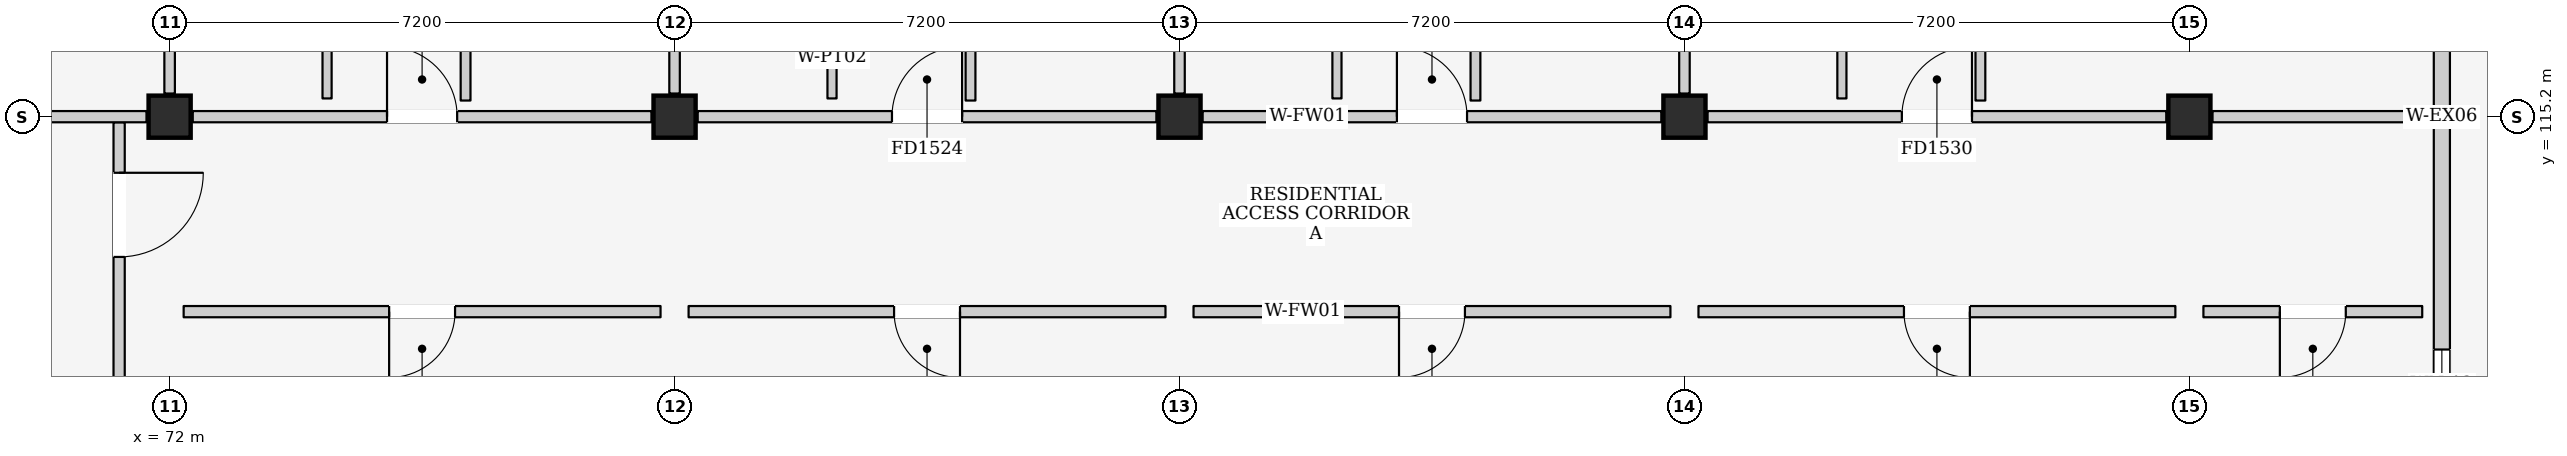
"""IFC4 building model, lengths in metres.
Left out: names, types, materials, properties, quantities, classifications, styles, units other than length and angle.
Written with IfcOpenShell. Run it as: python <this file> out.ifc"""

import sys

from ifc_helpers import new_model, si_unit, direction, frame, frame_2d, origin, origin_2d, place, context, subcontext, project, spatial, rectangle, extrude, element, fill, save


model = new_model("IFC4")
c1 = context("Model", 3, precision=1e-05, world=origin(), true_north=direction((0.0, 1.0)))
c2 = subcontext(c1, "Body", "Model", "MODEL_VIEW")
j1 = project(units=[si_unit("LENGTHUNIT", "METRE"), si_unit("PLANEANGLEUNIT", "RADIAN")], contexts=[c1])
p1 = place(None, origin())
s1 = spatial("IfcSite", under=j1, at=p1, CompositionType="ELEMENT")
p2 = place(p1, origin())
s2 = spatial("IfcBuilding", under=s1, at=p2, CompositionType="ELEMENT")
p3 = place(p2, frame((0.0, 0.0, 25.1)))
s3 = spatial("IfcBuildingStorey", under=s2, at=p3, CompositionType="ELEMENT", Elevation=25.1)
for number, where, z_axis, x_axis in (
    (1, (72.0, 115.2, 0.0), (0.0, 0.0, 1.0), (1.0, 0.0, 0.0)),
    (2, (79.2, 115.2, 0.0), (0.0, 0.0, 1.0), (1.0, 0.0, 0.0)),
    (3, (86.4, 115.2, 0.0), (0.0, 0.0, 1.0), (1.0, 0.0, 0.0)),
    (4, (93.6, 115.2, 0.0), (0.0, 0.0, 1.0), (1.0, 0.0, 0.0)),
    (5, (100.8, 115.2, 0.0), (0.0, 0.0, 1.0), (1.0, 0.0, 0.0)),
):
    element("IfcColumn", number, at=place(p3, frame(where, z_axis=z_axis, x_axis=x_axis)), inside=s3, PredefinedType="COLUMN", context=c2, shape_type="SweptSolid", body=[
        extrude(rectangle(XDim=0.6, YDim=0.6, at=origin_2d()), origin(), (0.0, 0.0, 1.0), 3.2),
    ])
p4 = place(p3, frame((104.4, 108.13, 0.0), z_axis=(0.0, 0.0, 1.0), x_axis=(0.0, 1.0, 0.0)))
e6 = element("IfcWall", 6, at=p4, inside=s3, PredefinedType="ELEMENTEDWALL", context=c2, shape_type="SweptSolid", body=[
    extrude(rectangle(XDim=7.07, YDim=0.23, at=frame_2d((3.535, 0.0))), origin(), (0.0, 0.0, 1.0), 2.425),
])
p5 = place(p4, frame((2.75, 0.0, 1.1)))
e7 = element("IfcOpeningElement", 7, at=p5, cuts=e6, PredefinedType="OPENING", context=c2, shape_type="SweptSolid", body=[
    extrude(rectangle(XDim=1.0, YDim=0.9, at=frame_2d((0.5, 0.45))), frame((0.0, 0.13, 0.0), z_axis=(0.0, -1.0, 0.0), x_axis=(1.0, 0.0, 0.0)), (0.0, 0.0, 1.0), 0.26),
])
p6 = place(p3, frame((104.4, 115.2, 0.0), z_axis=(0.0, 0.0, 1.0), x_axis=(0.0, 1.0, 0.0)))
e8 = element("IfcWall", 8, at=p6, inside=s3, PredefinedType="ELEMENTEDWALL", context=c2, shape_type="SweptSolid", body=[
    extrude(rectangle(XDim=7.07, YDim=0.23, at=frame_2d((3.535, 0.0))), origin(), (0.0, 0.0, 1.0), 2.425),
])
p7 = place(p6, frame((3.6, 0.0, 0.0)))
e9 = element("IfcOpeningElement", 9, at=p7, cuts=e8, PredefinedType="OPENING", context=c2, shape_type="SweptSolid", body=[
    extrude(rectangle(XDim=1.08, YDim=2.12, at=frame_2d((0.54, 1.06))), frame((0.0, 0.13, 0.0), z_axis=(0.0, -1.0, 0.0), x_axis=(1.0, 0.0, 0.0)), (0.0, 0.0, 1.0), 0.26),
])
p8 = place(p3, frame((71.28, 110.8, 0.0), z_axis=(0.0, 0.0, 1.0), x_axis=(0.0, 1.0, 0.0)))
e10 = element("IfcWall", 10, at=p8, inside=s3, PredefinedType="PARTITIONING", context=c2, shape_type="SweptSolid", body=[
    extrude(rectangle(XDim=4.32, YDim=0.16, at=frame_2d((2.16, 0.0))), origin(), (0.0, 0.0, 1.0), 2.99),
])
p9 = place(p8, frame((2.4, 0.0, 0.0)))
e11 = element("IfcOpeningElement", 11, at=p9, cuts=e10, PredefinedType="OPENING", context=c2, shape_type="SweptSolid", body=[
    extrude(rectangle(XDim=1.2, YDim=2.2, at=frame_2d((0.6, 1.1))), frame((0.0, 0.095, 0.0), z_axis=(0.0, -1.0, 0.0), x_axis=(1.0, 0.0, 0.0)), (0.0, 0.0, 1.0), 0.19),
])
p10 = place(p3, frame((65.13, 115.2, 0.0), z_axis=(0.0, 0.0, 1.0), x_axis=(1.0, 0.0, 0.0)))
e12 = element("IfcWall", 12, at=p10, inside=s3, PredefinedType="PARTITIONING", context=c2, shape_type="SweptSolid", body=[
    extrude(rectangle(XDim=6.54, YDim=0.16, at=frame_2d((3.27, 0.0))), origin(), (0.0, 0.0, 1.0), 2.325),
])
p11 = place(p3, frame((72.0, 115.53, 0.0), z_axis=(0.0, 0.0, 1.0), x_axis=(0.0, 1.0, 0.0)))
e13 = element("IfcWall", 13, at=p11, inside=s3, PredefinedType="PARTITIONING", context=c2, shape_type="SweptSolid", body=[
    extrude(rectangle(XDim=6.54, YDim=0.15, at=frame_2d((3.27, 0.0))), origin(), (0.0, 0.0, 1.0), 2.475),
])
p12 = place(p3, frame((72.33, 115.2, 0.0), z_axis=(0.0, 0.0, 1.0), x_axis=(1.0, 0.0, 0.0)))
e14 = element("IfcWall", 14, at=p12, inside=s3, PredefinedType="PARTITIONING", context=c2, shape_type="SweptSolid", body=[
    extrude(rectangle(XDim=6.54, YDim=0.16, at=frame_2d((3.27, 0.0))), origin(), (0.0, 0.0, 1.0), 2.325),
])
p13 = place(p12, frame((2.77, 0.0, 0.0)))
e15 = element("IfcOpeningElement", 15, at=p13, cuts=e14, PredefinedType="OPENING", context=c2, shape_type="SweptSolid", body=[
    extrude(rectangle(XDim=1.0, YDim=2.15, at=frame_2d((0.5, 1.075))), frame((0.0, 0.095, 0.0), z_axis=(0.0, -1.0, 0.0), x_axis=(1.0, 0.0, 0.0)), (0.0, 0.0, 1.0), 0.19),
])
p14 = place(p3, frame((79.2, 115.53, 0.0), z_axis=(0.0, 0.0, 1.0), x_axis=(0.0, 1.0, 0.0)))
e16 = element("IfcWall", 16, at=p14, inside=s3, PredefinedType="PARTITIONING", context=c2, shape_type="SweptSolid", body=[
    extrude(rectangle(XDim=6.54, YDim=0.15, at=frame_2d((3.27, 0.0))), origin(), (0.0, 0.0, 1.0), 2.475),
])
p15 = place(p3, frame((74.245, 115.46, 0.0), z_axis=(0.0, 0.0, 1.0), x_axis=(0.0, 1.0, 0.0)))
e17 = element("IfcWall", 17, at=p15, inside=s3, PredefinedType="PARTITIONING", context=c2, shape_type="SweptSolid", body=[
    extrude(rectangle(XDim=2.13, YDim=0.13, at=frame_2d((1.065, 0.0))), origin(), (0.0, 0.0, 1.0), 2.99),
])
p16 = place(p3, frame((76.22, 115.43, 0.0), z_axis=(0.0, 0.0, 1.0), x_axis=(0.0, 1.0, 0.0)))
e18 = element("IfcWall", 18, at=p16, inside=s3, PredefinedType="PARTITIONING", context=c2, shape_type="SweptSolid", body=[
    extrude(rectangle(XDim=2.15, YDim=0.14, at=frame_2d((1.075, 0.0))), origin(), (0.0, 0.0, 1.0), 2.99),
])
p17 = place(p3, frame((79.53, 115.2, 0.0), z_axis=(0.0, 0.0, 1.0), x_axis=(1.0, 0.0, 0.0)))
e19 = element("IfcWall", 19, at=p17, inside=s3, PredefinedType="PARTITIONING", context=c2, shape_type="SweptSolid", body=[
    extrude(rectangle(XDim=6.54, YDim=0.16, at=frame_2d((3.27, 0.0))), origin(), (0.0, 0.0, 1.0), 2.325),
])
p18 = place(p17, frame((2.77, 0.0, 0.0)))
e20 = element("IfcOpeningElement", 20, at=p18, cuts=e19, PredefinedType="OPENING", context=c2, shape_type="SweptSolid", body=[
    extrude(rectangle(XDim=1.0, YDim=2.15, at=frame_2d((0.5, 1.075))), frame((0.0, 0.095, 0.0), z_axis=(0.0, -1.0, 0.0), x_axis=(1.0, 0.0, 0.0)), (0.0, 0.0, 1.0), 0.19),
])
p19 = place(p3, frame((86.4, 115.53, 0.0), z_axis=(0.0, 0.0, 1.0), x_axis=(0.0, 1.0, 0.0)))
e21 = element("IfcWall", 21, at=p19, inside=s3, PredefinedType="PARTITIONING", context=c2, shape_type="SweptSolid", body=[
    extrude(rectangle(XDim=6.54, YDim=0.15, at=frame_2d((3.27, 0.0))), origin(), (0.0, 0.0, 1.0), 2.475),
])
p20 = place(p3, frame((81.445, 115.46, 0.0), z_axis=(0.0, 0.0, 1.0), x_axis=(0.0, 1.0, 0.0)))
e22 = element("IfcWall", 22, at=p20, inside=s3, PredefinedType="PARTITIONING", context=c2, shape_type="SweptSolid", body=[
    extrude(rectangle(XDim=2.13, YDim=0.13, at=frame_2d((1.065, 0.0))), origin(), (0.0, 0.0, 1.0), 2.99),
])
p21 = place(p3, frame((83.42, 115.43, 0.0), z_axis=(0.0, 0.0, 1.0), x_axis=(0.0, 1.0, 0.0)))
e23 = element("IfcWall", 23, at=p21, inside=s3, PredefinedType="PARTITIONING", context=c2, shape_type="SweptSolid", body=[
    extrude(rectangle(XDim=2.15, YDim=0.14, at=frame_2d((1.075, 0.0))), origin(), (0.0, 0.0, 1.0), 2.99),
])
p22 = place(p3, frame((86.73, 115.2, 0.0), z_axis=(0.0, 0.0, 1.0), x_axis=(1.0, 0.0, 0.0)))
e24 = element("IfcWall", 24, at=p22, inside=s3, PredefinedType="PARTITIONING", context=c2, shape_type="SweptSolid", body=[
    extrude(rectangle(XDim=6.54, YDim=0.16, at=frame_2d((3.27, 0.0))), origin(), (0.0, 0.0, 1.0), 2.325),
])
p23 = place(p22, frame((2.77, 0.0, 0.0)))
e25 = element("IfcOpeningElement", 25, at=p23, cuts=e24, PredefinedType="OPENING", context=c2, shape_type="SweptSolid", body=[
    extrude(rectangle(XDim=1.0, YDim=2.15, at=frame_2d((0.5, 1.075))), frame((0.0, 0.095, 0.0), z_axis=(0.0, -1.0, 0.0), x_axis=(1.0, 0.0, 0.0)), (0.0, 0.0, 1.0), 0.19),
])
p24 = place(p3, frame((93.6, 115.53, 0.0), z_axis=(0.0, 0.0, 1.0), x_axis=(0.0, 1.0, 0.0)))
e26 = element("IfcWall", 26, at=p24, inside=s3, PredefinedType="PARTITIONING", context=c2, shape_type="SweptSolid", body=[
    extrude(rectangle(XDim=6.54, YDim=0.15, at=frame_2d((3.27, 0.0))), origin(), (0.0, 0.0, 1.0), 2.475),
])
p25 = place(p3, frame((88.645, 115.46, 0.0), z_axis=(0.0, 0.0, 1.0), x_axis=(0.0, 1.0, 0.0)))
e27 = element("IfcWall", 27, at=p25, inside=s3, PredefinedType="PARTITIONING", context=c2, shape_type="SweptSolid", body=[
    extrude(rectangle(XDim=2.13, YDim=0.13, at=frame_2d((1.065, 0.0))), origin(), (0.0, 0.0, 1.0), 2.99),
])
p26 = place(p3, frame((90.62, 115.43, 0.0), z_axis=(0.0, 0.0, 1.0), x_axis=(0.0, 1.0, 0.0)))
e28 = element("IfcWall", 28, at=p26, inside=s3, PredefinedType="PARTITIONING", context=c2, shape_type="SweptSolid", body=[
    extrude(rectangle(XDim=2.15, YDim=0.14, at=frame_2d((1.075, 0.0))), origin(), (0.0, 0.0, 1.0), 2.99),
])
p27 = place(p3, frame((93.93, 115.2, 0.0), z_axis=(0.0, 0.0, 1.0), x_axis=(1.0, 0.0, 0.0)))
e29 = element("IfcWall", 29, at=p27, inside=s3, PredefinedType="PARTITIONING", context=c2, shape_type="SweptSolid", body=[
    extrude(rectangle(XDim=6.54, YDim=0.16, at=frame_2d((3.27, 0.0))), origin(), (0.0, 0.0, 1.0), 2.325),
])
p28 = place(p27, frame((2.77, 0.0, 0.0)))
e30 = element("IfcOpeningElement", 30, at=p28, cuts=e29, PredefinedType="OPENING", context=c2, shape_type="SweptSolid", body=[
    extrude(rectangle(XDim=1.0, YDim=2.15, at=frame_2d((0.5, 1.075))), frame((0.0, 0.095, 0.0), z_axis=(0.0, -1.0, 0.0), x_axis=(1.0, 0.0, 0.0)), (0.0, 0.0, 1.0), 0.19),
])
p29 = place(p3, frame((101.13, 115.2, 0.0), z_axis=(0.0, 0.0, 1.0), x_axis=(1.0, 0.0, 0.0)))
e31 = element("IfcWall", 31, at=p29, inside=s3, PredefinedType="PARTITIONING", context=c2, shape_type="SweptSolid", body=[
    extrude(rectangle(XDim=2.99, YDim=0.16, at=frame_2d((1.495, 0.0))), origin(), (0.0, 0.0, 1.0), 2.325),
])
p30 = place(p3, frame((95.845, 115.46, 0.0), z_axis=(0.0, 0.0, 1.0), x_axis=(0.0, 1.0, 0.0)))
e32 = element("IfcWall", 32, at=p30, inside=s3, PredefinedType="PARTITIONING", context=c2, shape_type="SweptSolid", body=[
    extrude(rectangle(XDim=2.13, YDim=0.13, at=frame_2d((1.065, 0.0))), origin(), (0.0, 0.0, 1.0), 2.99),
])
p31 = place(p3, frame((97.82, 115.43, 0.0), z_axis=(0.0, 0.0, 1.0), x_axis=(0.0, 1.0, 0.0)))
e33 = element("IfcWall", 33, at=p31, inside=s3, PredefinedType="PARTITIONING", context=c2, shape_type="SweptSolid", body=[
    extrude(rectangle(XDim=2.15, YDim=0.14, at=frame_2d((1.075, 0.0))), origin(), (0.0, 0.0, 1.0), 2.99),
])
p32 = place(p3, frame((72.2, 112.42, 0.0), z_axis=(0.0, 0.0, 1.0), x_axis=(1.0, 0.0, 0.0)))
e34 = element("IfcWall", 34, at=p32, inside=s3, PredefinedType="PARTITIONING", context=c2, shape_type="SweptSolid", body=[
    extrude(rectangle(XDim=6.8, YDim=0.16, at=frame_2d((3.4, 0.0))), origin(), (0.0, 0.0, 1.0), 2.99),
])
p33 = place(p32, frame((2.93, 0.0, 0.0)))
e35 = element("IfcOpeningElement", 35, at=p33, cuts=e34, PredefinedType="OPENING", context=c2, shape_type="SweptSolid", body=[
    extrude(rectangle(XDim=0.94, YDim=2.12, at=frame_2d((0.47, 1.06))), frame((0.0, 0.095, 0.0), z_axis=(0.0, -1.0, 0.0), x_axis=(1.0, 0.0, 0.0)), (0.0, 0.0, 1.0), 0.19),
])
p34 = place(p3, frame((79.4, 112.42, 0.0), z_axis=(0.0, 0.0, 1.0), x_axis=(1.0, 0.0, 0.0)))
e36 = element("IfcWall", 36, at=p34, inside=s3, PredefinedType="PARTITIONING", context=c2, shape_type="SweptSolid", body=[
    extrude(rectangle(XDim=6.8, YDim=0.16, at=frame_2d((3.4, 0.0))), origin(), (0.0, 0.0, 1.0), 2.99),
])
p35 = place(p34, frame((2.93, 0.0, 0.0)))
e37 = element("IfcOpeningElement", 37, at=p35, cuts=e36, PredefinedType="OPENING", context=c2, shape_type="SweptSolid", body=[
    extrude(rectangle(XDim=0.94, YDim=2.12, at=frame_2d((0.47, 1.06))), frame((0.0, 0.095, 0.0), z_axis=(0.0, -1.0, 0.0), x_axis=(1.0, 0.0, 0.0)), (0.0, 0.0, 1.0), 0.19),
])
p36 = place(p3, frame((86.6, 112.42, 0.0), z_axis=(0.0, 0.0, 1.0), x_axis=(1.0, 0.0, 0.0)))
e38 = element("IfcWall", 38, at=p36, inside=s3, PredefinedType="PARTITIONING", context=c2, shape_type="SweptSolid", body=[
    extrude(rectangle(XDim=6.8, YDim=0.16, at=frame_2d((3.4, 0.0))), origin(), (0.0, 0.0, 1.0), 2.99),
])
p37 = place(p36, frame((2.93, 0.0, 0.0)))
e39 = element("IfcOpeningElement", 39, at=p37, cuts=e38, PredefinedType="OPENING", context=c2, shape_type="SweptSolid", body=[
    extrude(rectangle(XDim=0.94, YDim=2.12, at=frame_2d((0.47, 1.06))), frame((0.0, 0.095, 0.0), z_axis=(0.0, -1.0, 0.0), x_axis=(1.0, 0.0, 0.0)), (0.0, 0.0, 1.0), 0.19),
])
p38 = place(p3, frame((93.8, 112.42, 0.0), z_axis=(0.0, 0.0, 1.0), x_axis=(1.0, 0.0, 0.0)))
e40 = element("IfcWall", 40, at=p38, inside=s3, PredefinedType="PARTITIONING", context=c2, shape_type="SweptSolid", body=[
    extrude(rectangle(XDim=6.8, YDim=0.16, at=frame_2d((3.4, 0.0))), origin(), (0.0, 0.0, 1.0), 2.99),
])
p39 = place(p38, frame((2.93, 0.0, 0.0)))
e41 = element("IfcOpeningElement", 41, at=p39, cuts=e40, PredefinedType="OPENING", context=c2, shape_type="SweptSolid", body=[
    extrude(rectangle(XDim=0.94, YDim=2.12, at=frame_2d((0.47, 1.06))), frame((0.0, 0.095, 0.0), z_axis=(0.0, -1.0, 0.0), x_axis=(1.0, 0.0, 0.0)), (0.0, 0.0, 1.0), 0.19),
])
p40 = place(p3, frame((101.0, 112.42, 0.0), z_axis=(0.0, 0.0, 1.0), x_axis=(1.0, 0.0, 0.0)))
e42 = element("IfcWall", 42, at=p40, inside=s3, PredefinedType="PARTITIONING", context=c2, shape_type="SweptSolid", body=[
    extrude(rectangle(XDim=3.12, YDim=0.16, at=frame_2d((1.56, 0.0))), origin(), (0.0, 0.0, 1.0), 2.99),
])
p41 = place(p40, frame((1.09, 0.0, 0.0)))
e43 = element("IfcOpeningElement", 43, at=p41, cuts=e42, PredefinedType="OPENING", context=c2, shape_type="SweptSolid", body=[
    extrude(rectangle(XDim=0.94, YDim=2.12, at=frame_2d((0.47, 1.06))), frame((0.0, 0.095, 0.0), z_axis=(0.0, -1.0, 0.0), x_axis=(1.0, 0.0, 0.0)), (0.0, 0.0, 1.0), 0.19),
])
p42 = place(p5, origin())
e44 = element("IfcWindow", 44, at=p42, inside=s3, PartitioningType="SINGLE_PANEL", PredefinedType="WINDOW", context=c2, shape_type="SweptSolid", body=[
    extrude(rectangle(XDim=1.0, YDim=0.9, at=frame_2d((0.5, 0.45))), frame((0.0, 0.03, 0.0), z_axis=(0.0, -1.0, 0.0), x_axis=(1.0, 0.0, 0.0)), (0.0, 0.0, 1.0), 0.06),
])
fill(e7, e44)
p43 = place(p9, frame((1.2, 0.0, 0.0), z_axis=(0.0, 0.0, 1.0), x_axis=(-1.0, 0.0, 0.0)))
e45 = element("IfcDoor", 45, at=p43, inside=s3, OperationType="SINGLE_SWING_LEFT", PredefinedType="DOOR", context=c2, shape_type="SweptSolid", body=[
    extrude(rectangle(XDim=1.2, YDim=2.2, at=frame_2d((0.6, 1.1))), frame((0.0, 0.025, 0.0), z_axis=(0.0, -1.0, 0.0), x_axis=(1.0, 0.0, 0.0)), (0.0, 0.0, 1.0), 0.05),
])
fill(e11, e45)
p44 = place(p13, origin())
e46 = element("IfcDoor", 46, at=p44, inside=s3, OperationType="SINGLE_SWING_LEFT", PredefinedType="DOOR", context=c2, shape_type="SweptSolid", body=[
    extrude(rectangle(XDim=1.0, YDim=2.15, at=frame_2d((0.5, 1.075))), frame((0.0, 0.025, 0.0), z_axis=(0.0, -1.0, 0.0), x_axis=(1.0, 0.0, 0.0)), (0.0, 0.0, 1.0), 0.05),
])
fill(e15, e46)
p45 = place(p18, origin())
e47 = element("IfcDoor", 47, at=p45, inside=s3, OperationType="SINGLE_SWING_RIGHT", PredefinedType="DOOR", context=c2, shape_type="SweptSolid", body=[
    extrude(rectangle(XDim=1.0, YDim=2.15, at=frame_2d((0.5, 1.075))), frame((0.0, 0.025, 0.0), z_axis=(0.0, -1.0, 0.0), x_axis=(1.0, 0.0, 0.0)), (0.0, 0.0, 1.0), 0.05),
])
fill(e20, e47)
p46 = place(p23, origin())
e48 = element("IfcDoor", 48, at=p46, inside=s3, OperationType="SINGLE_SWING_LEFT", PredefinedType="DOOR", context=c2, shape_type="SweptSolid", body=[
    extrude(rectangle(XDim=1.0, YDim=2.15, at=frame_2d((0.5, 1.075))), frame((0.0, 0.025, 0.0), z_axis=(0.0, -1.0, 0.0), x_axis=(1.0, 0.0, 0.0)), (0.0, 0.0, 1.0), 0.05),
])
fill(e25, e48)
p47 = place(p28, origin())
e49 = element("IfcDoor", 49, at=p47, inside=s3, OperationType="SINGLE_SWING_RIGHT", PredefinedType="DOOR", context=c2, shape_type="SweptSolid", body=[
    extrude(rectangle(XDim=1.0, YDim=2.15, at=frame_2d((0.5, 1.075))), frame((0.0, 0.025, 0.0), z_axis=(0.0, -1.0, 0.0), x_axis=(1.0, 0.0, 0.0)), (0.0, 0.0, 1.0), 0.05),
])
fill(e30, e49)
p48 = place(p33, frame((0.94, 0.0, 0.0), z_axis=(0.0, 0.0, 1.0), x_axis=(-1.0, 0.0, 0.0)))
e50 = element("IfcDoor", 50, at=p48, inside=s3, OperationType="SINGLE_SWING_RIGHT", PredefinedType="DOOR", context=c2, shape_type="SweptSolid", body=[
    extrude(rectangle(XDim=0.94, YDim=2.12, at=frame_2d((0.47, 1.06))), frame((0.0, 0.025, 0.0), z_axis=(0.0, -1.0, 0.0), x_axis=(1.0, 0.0, 0.0)), (0.0, 0.0, 1.0), 0.05),
])
fill(e35, e50)
p49 = place(p35, frame((0.94, 0.0, 0.0), z_axis=(0.0, 0.0, 1.0), x_axis=(-1.0, 0.0, 0.0)))
e51 = element("IfcDoor", 51, at=p49, inside=s3, OperationType="SINGLE_SWING_LEFT", PredefinedType="DOOR", context=c2, shape_type="SweptSolid", body=[
    extrude(rectangle(XDim=0.94, YDim=2.12, at=frame_2d((0.47, 1.06))), frame((0.0, 0.025, 0.0), z_axis=(0.0, -1.0, 0.0), x_axis=(1.0, 0.0, 0.0)), (0.0, 0.0, 1.0), 0.05),
])
fill(e37, e51)
p50 = place(p37, frame((0.94, 0.0, 0.0), z_axis=(0.0, 0.0, 1.0), x_axis=(-1.0, 0.0, 0.0)))
e52 = element("IfcDoor", 52, at=p50, inside=s3, OperationType="SINGLE_SWING_RIGHT", PredefinedType="DOOR", context=c2, shape_type="SweptSolid", body=[
    extrude(rectangle(XDim=0.94, YDim=2.12, at=frame_2d((0.47, 1.06))), frame((0.0, 0.025, 0.0), z_axis=(0.0, -1.0, 0.0), x_axis=(1.0, 0.0, 0.0)), (0.0, 0.0, 1.0), 0.05),
])
fill(e39, e52)
p51 = place(p39, frame((0.94, 0.0, 0.0), z_axis=(0.0, 0.0, 1.0), x_axis=(-1.0, 0.0, 0.0)))
e53 = element("IfcDoor", 53, at=p51, inside=s3, OperationType="SINGLE_SWING_LEFT", PredefinedType="DOOR", context=c2, shape_type="SweptSolid", body=[
    extrude(rectangle(XDim=0.94, YDim=2.12, at=frame_2d((0.47, 1.06))), frame((0.0, 0.025, 0.0), z_axis=(0.0, -1.0, 0.0), x_axis=(1.0, 0.0, 0.0)), (0.0, 0.0, 1.0), 0.05),
])
fill(e41, e53)
p52 = place(p41, frame((0.94, 0.0, 0.0), z_axis=(0.0, 0.0, 1.0), x_axis=(-1.0, 0.0, 0.0)))
e54 = element("IfcDoor", 54, at=p52, inside=s3, OperationType="SINGLE_SWING_RIGHT", PredefinedType="DOOR", context=c2, shape_type="SweptSolid", body=[
    extrude(rectangle(XDim=0.94, YDim=2.12, at=frame_2d((0.47, 1.06))), frame((0.0, 0.025, 0.0), z_axis=(0.0, -1.0, 0.0), x_axis=(1.0, 0.0, 0.0)), (0.0, 0.0, 1.0), 0.05),
])
fill(e43, e54)
save(model, sys.argv[1])
